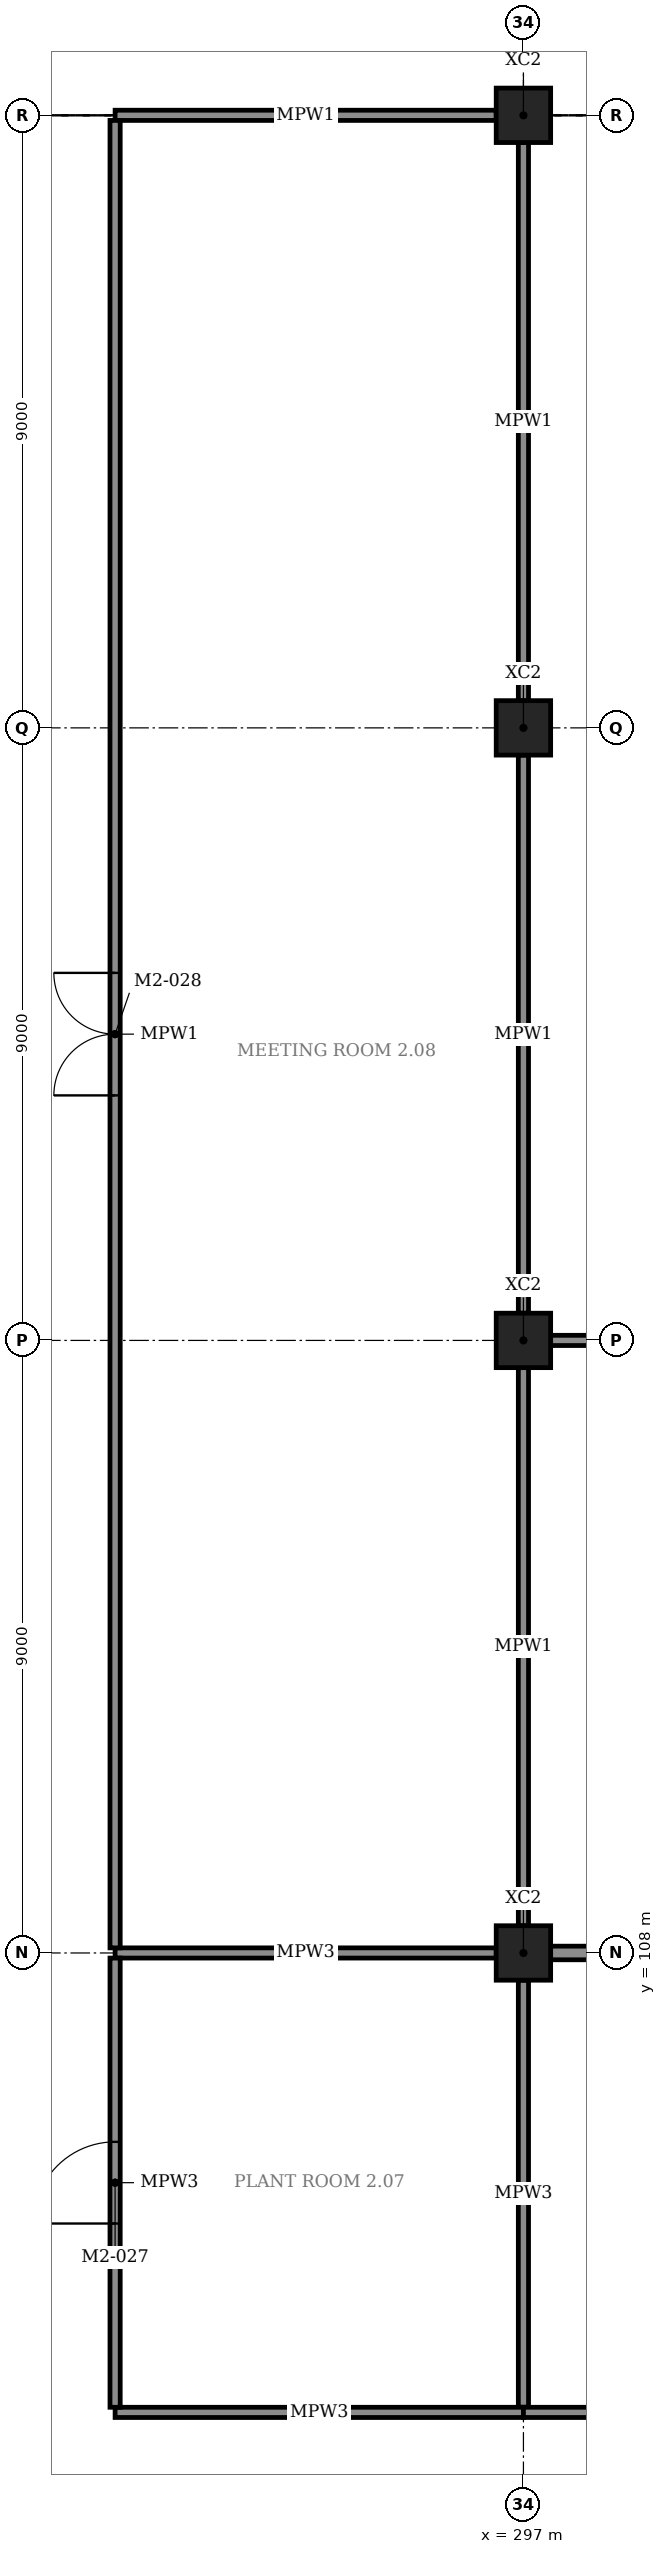
"""IFC4 building model, lengths in metres.
Left out: names, types, materials, properties, quantities, classifications, styles, units other than length and angle.
Written with IfcOpenShell. Run it as: python <this file> out.ifc"""

import sys

from ifc_helpers import new_model, si_unit, direction, frame, frame_2d, origin, origin_2d, place, context, subcontext, project, spatial, rectangle, extrude, element, fill, save


model = new_model("IFC4")
c1 = context("Model", 3, precision=1e-05, world=origin(), true_north=direction((0.0, 1.0)))
c2 = subcontext(c1, "Body", "Model", "MODEL_VIEW")
j1 = project(units=[si_unit("LENGTHUNIT", "METRE"), si_unit("PLANEANGLEUNIT", "RADIAN")], contexts=[c1])
p1 = place(None, origin())
s1 = spatial("IfcSite", under=j1, at=p1, CompositionType="ELEMENT")
p2 = place(p1, origin())
s2 = spatial("IfcBuilding", under=s1, at=p2, CompositionType="ELEMENT")
p3 = place(p2, frame((0.0, 0.0, 11.5)))
s3 = spatial("IfcBuildingStorey", under=s2, at=p3, CompositionType="ELEMENT", Elevation=11.5)
for number, where, z_axis, x_axis in (
    (1, (297.0, 108.0, 0.0), (0.0, 0.0, 1.0), (1.0, 0.0, 0.0)),
    (2, (297.0, 117.0, 0.0), (0.0, 0.0, 1.0), (1.0, 0.0, 0.0)),
    (3, (297.0, 126.0, 0.0), (0.0, 0.0, 1.0), (1.0, 0.0, 0.0)),
    (4, (297.0, 135.0, 0.0), (0.0, 0.0, 1.0), (1.0, 0.0, 0.0)),
):
    element("IfcColumn", number, at=place(p3, frame(where, z_axis=z_axis, x_axis=x_axis)), inside=s3, PredefinedType="COLUMN", context=c2, shape_type="SweptSolid", body=[
        extrude(rectangle(XDim=0.8, YDim=0.8, at=origin_2d()), origin(), (0.0, 0.0, 1.0), 5.5),
    ])
p4 = place(p3, frame((291.0, 101.25, 0.0), z_axis=(0.0, 0.0, 1.0), x_axis=(1.0, 0.0, 0.0)))
e5 = element("IfcWall", 5, at=p4, inside=s3, PredefinedType="PARTITIONING", context=c2, shape_type="SweptSolid", body=[
    extrude(rectangle(XDim=6.0, YDim=0.15, at=frame_2d((3.0, 0.0))), origin(), (0.0, 0.0, 1.0), 4.32),
])
p5 = place(p3, frame((291.0, 108.0, 0.0), z_axis=(0.0, 0.0, 1.0), x_axis=(1.0, 0.0, 0.0)))
e6 = element("IfcWall", 6, at=p5, inside=s3, PredefinedType="PARTITIONING", context=c2, shape_type="SweptSolid", body=[
    extrude(rectangle(XDim=5.6, YDim=0.15, at=frame_2d((2.8, 0.0))), origin(), (0.0, 0.0, 1.0), 4.32),
])
p6 = place(p3, frame((291.0, 101.325, 0.0), z_axis=(0.0, 0.0, 1.0), x_axis=(0.0, 1.0, 0.0)))
e7 = element("IfcWall", 7, at=p6, inside=s3, PredefinedType="PARTITIONING", context=c2, shape_type="SweptSolid", body=[
    extrude(rectangle(XDim=6.6, YDim=0.15, at=frame_2d((3.3, 0.0))), origin(), (0.0, 0.0, 1.0), 4.32),
])
p7 = place(p6, frame((2.7, 0.0, 0.0)))
e8 = element("IfcOpeningElement", 8, at=p7, cuts=e7, PredefinedType="OPENING", context=c2, shape_type="SweptSolid", body=[
    extrude(rectangle(XDim=1.2, YDim=2.4, at=frame_2d((0.6, 1.2))), frame((0.0, 0.085, 0.0), z_axis=(0.0, -1.0, 0.0), x_axis=(1.0, 0.0, 0.0)), (0.0, 0.0, 1.0), 0.17),
])
p8 = place(p3, frame((297.0, 101.325, 0.0), z_axis=(0.0, 0.0, 1.0), x_axis=(0.0, 1.0, 0.0)))
e9 = element("IfcWall", 9, at=p8, inside=s3, PredefinedType="PARTITIONING", context=c2, shape_type="SweptSolid", body=[
    extrude(rectangle(XDim=6.275, YDim=0.15, at=frame_2d((3.138, 0.0))), origin(), (0.0, 0.0, 1.0), 4.32),
])
p9 = place(p3, frame((291.0, 135.0, 0.0), z_axis=(0.0, 0.0, 1.0), x_axis=(1.0, 0.0, 0.0)))
e10 = element("IfcWall", 10, at=p9, inside=s3, PredefinedType="PARTITIONING", context=c2, shape_type="SweptSolid", body=[
    extrude(rectangle(XDim=5.6, YDim=0.15, at=frame_2d((2.8, 0.0))), origin(), (0.0, 0.0, 1.0), 4.32),
])
p10 = place(p3, frame((291.0, 108.075, 0.0), z_axis=(0.0, 0.0, 1.0), x_axis=(0.0, 1.0, 0.0)))
e11 = element("IfcWall", 11, at=p10, inside=s3, PredefinedType="PARTITIONING", context=c2, shape_type="SweptSolid", body=[
    extrude(rectangle(XDim=26.85, YDim=0.15, at=frame_2d((13.425, 0.0))), origin(), (0.0, 0.0, 1.0), 4.32),
])
p11 = place(p10, frame((12.525, 0.0, 0.0)))
e12 = element("IfcOpeningElement", 12, at=p11, cuts=e11, PredefinedType="OPENING", context=c2, shape_type="SweptSolid", body=[
    extrude(rectangle(XDim=1.8, YDim=2.4, at=frame_2d((0.9, 1.2))), frame((0.0, 0.085, 0.0), z_axis=(0.0, -1.0, 0.0), x_axis=(1.0, 0.0, 0.0)), (0.0, 0.0, 1.0), 0.17),
])
for number, where, z_axis, x_axis in (
    (13, (297.0, 108.4, 0.0), (0.0, 0.0, 1.0), (0.0, 1.0, 0.0)),
    (14, (297.0, 117.4, 0.0), (0.0, 0.0, 1.0), (0.0, 1.0, 0.0)),
    (15, (297.0, 126.4, 0.0), (0.0, 0.0, 1.0), (0.0, 1.0, 0.0)),
):
    element("IfcWall", number, at=place(p3, frame(where, z_axis=z_axis, x_axis=x_axis)), inside=s3, PredefinedType="PARTITIONING", context=c2, shape_type="SweptSolid", body=[
        extrude(rectangle(XDim=8.2, YDim=0.15, at=frame_2d((4.1, 0.0))), origin(), (0.0, 0.0, 1.0), 4.32),
    ])
p12 = place(p3, frame((297.0, 101.25, 0.0), z_axis=(0.0, 0.0, 1.0), x_axis=(1.0, 0.0, 0.0)))
e16 = element("IfcWall", 16, at=p12, inside=s3, PredefinedType="PARTITIONING", context=c2, shape_type="SweptSolid", body=[
    extrude(rectangle(XDim=18.0, YDim=0.15, at=frame_2d((9.0, 0.0))), origin(), (0.0, 0.0, 1.0), 4.32),
])
p13 = place(p12, frame((8.1, 0.0, 0.0)))
e17 = element("IfcOpeningElement", 17, at=p13, cuts=e16, PredefinedType="OPENING", context=c2, shape_type="SweptSolid", body=[
    extrude(rectangle(XDim=1.8, YDim=2.4, at=frame_2d((0.9, 1.2))), frame((0.0, 0.085, 0.0), z_axis=(0.0, -1.0, 0.0), x_axis=(1.0, 0.0, 0.0)), (0.0, 0.0, 1.0), 0.17),
])
p14 = place(p3, frame((297.4, 108.0, 0.0), z_axis=(0.0, 0.0, 1.0), x_axis=(1.0, 0.0, 0.0)))
e18 = element("IfcWall", 18, at=p14, inside=s3, PredefinedType="PARTITIONING", context=c2, shape_type="SweptSolid", body=[
    extrude(rectangle(XDim=8.2, YDim=0.2, at=frame_2d((4.1, 0.0))), origin(), (0.0, 0.0, 1.0), 4.32),
])
p15 = place(p3, frame((297.4, 117.0, 0.0), z_axis=(0.0, 0.0, 1.0), x_axis=(1.0, 0.0, 0.0)))
e19 = element("IfcWall", 19, at=p15, inside=s3, PredefinedType="PARTITIONING", context=c2, shape_type="SweptSolid", body=[
    extrude(rectangle(XDim=8.2, YDim=0.15, at=frame_2d((4.1, 0.0))), origin(), (0.0, 0.0, 1.0), 4.32),
])
p16 = place(p15, frame((3.6, 0.0, 0.0)))
e20 = element("IfcOpeningElement", 20, at=p16, cuts=e19, PredefinedType="OPENING", context=c2, shape_type="SweptSolid", body=[
    extrude(rectangle(XDim=1.0, YDim=2.4, at=frame_2d((0.5, 1.2))), frame((0.0, 0.085, 0.0), z_axis=(0.0, -1.0, 0.0), x_axis=(1.0, 0.0, 0.0)), (0.0, 0.0, 1.0), 0.17),
])
p17 = place(p7, origin())
e21 = element("IfcDoor", 21, at=p17, inside=s3, OperationType="SINGLE_SWING_LEFT", PredefinedType="DOOR", context=c2, shape_type="SweptSolid", body=[
    extrude(rectangle(XDim=1.2, YDim=2.4, at=frame_2d((0.6, 1.2))), frame((0.0, 0.025, 0.0), z_axis=(0.0, -1.0, 0.0), x_axis=(1.0, 0.0, 0.0)), (0.0, 0.0, 1.0), 0.05),
])
fill(e8, e21)
p18 = place(p11, origin())
e22 = element("IfcDoor", 22, at=p18, inside=s3, OperationType="DOUBLE_DOOR_SINGLE_SWING", PredefinedType="DOOR", context=c2, shape_type="SweptSolid", body=[
    extrude(rectangle(XDim=1.8, YDim=2.4, at=frame_2d((0.9, 1.2))), frame((0.0, 0.025, 0.0), z_axis=(0.0, -1.0, 0.0), x_axis=(1.0, 0.0, 0.0)), (0.0, 0.0, 1.0), 0.05),
])
fill(e12, e22)
save(model, sys.argv[1])
